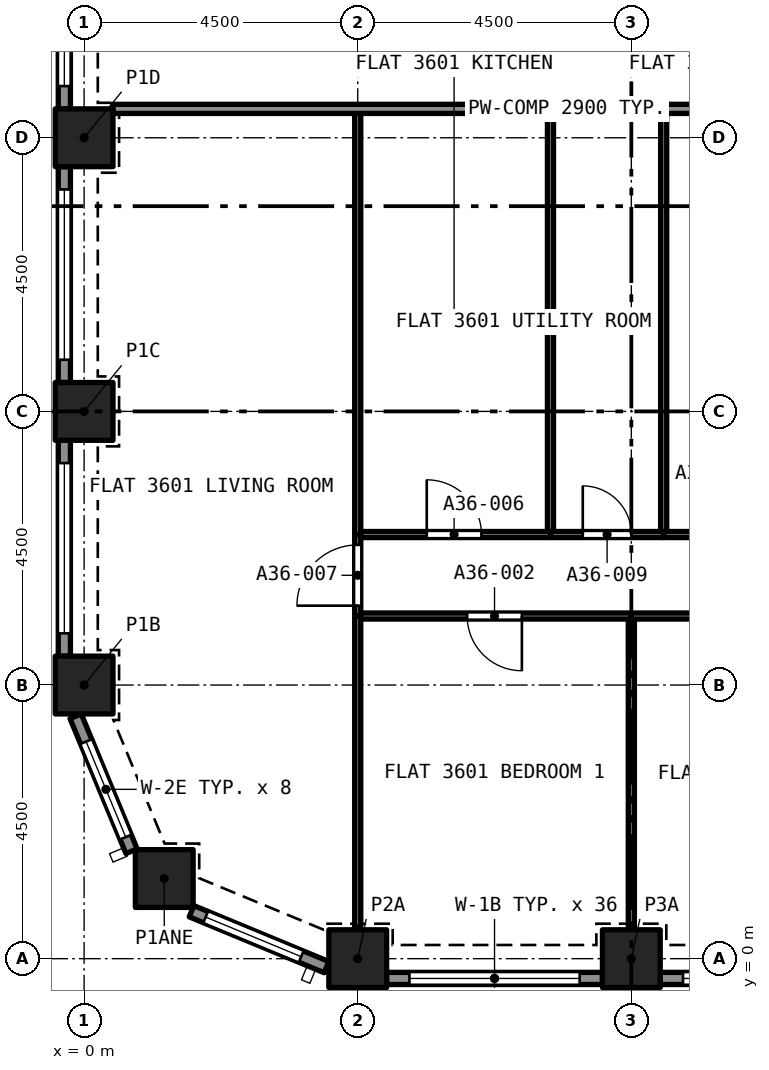
"""IFC4 building model, lengths in metres.
Left out: names, types, materials, properties, quantities, classifications, styles, units other than length and angle.
Written with IfcOpenShell. Run it as: python <this file> out.ifc"""

import sys

from ifc_helpers import new_model, si_unit, direction, frame, frame_2d, origin, origin_2d, place, context, subcontext, project, spatial, rectangle, extrude, element, fill, save


model = new_model("IFC4")
c1 = context("Model", 3, precision=1e-05, world=origin(), true_north=direction((0.0, 1.0)))
c2 = subcontext(c1, "Body", "Model", "MODEL_VIEW")
j1 = project(units=[si_unit("LENGTHUNIT", "METRE"), si_unit("PLANEANGLEUNIT", "RADIAN")], contexts=[c1])
p1 = place(None, origin())
s1 = spatial("IfcSite", under=j1, at=p1, CompositionType="ELEMENT")
p2 = place(p1, origin())
s2 = spatial("IfcBuilding", under=s1, at=p2, CompositionType="ELEMENT")
p3 = place(p2, frame((0.0, 0.0, 130.2)))
s3 = spatial("IfcBuildingStorey", under=s2, at=p3, CompositionType="ELEMENT", Elevation=130.2)
for number, where, z_axis, x_axis in (
    (1, (4.5, 0.0, 0.0), (0.0, 0.0, 1.0), (1.0, 0.0, 0.0)),
    (2, (9.0, 0.0, 0.0), (0.0, 0.0, 1.0), (1.0, 0.0, 0.0)),
    (3, (1.318, 1.318, 0.0), (0.0, 0.0, 1.0), (1.0, 0.0, 0.0)),
    (4, (0.0, 4.5, 0.0), (0.0, 0.0, 1.0), (1.0, 0.0, 0.0)),
    (5, (0.0, 9.0, 0.0), (0.0, 0.0, 1.0), (1.0, 0.0, 0.0)),
    (6, (0.0, 13.5, 0.0), (0.0, 0.0, 1.0), (1.0, 0.0, 0.0)),
):
    element("IfcColumn", number, at=place(p3, frame(where, z_axis=z_axis, x_axis=x_axis)), inside=s3, PredefinedType="COLUMN", context=c2, shape_type="SweptSolid", body=[
        extrude(rectangle(XDim=0.95, YDim=0.95, at=origin_2d()), origin(), (0.0, 0.0, 1.0), 3.2),
    ])
p4 = place(p3, frame((0.78, 1.767, 0.0), z_axis=(0.0, 0.0, 1.0), x_axis=(-0.382680855588, 0.923880599843, 0.0)))
e7 = element("IfcWall", 7, at=p4, inside=s3, PredefinedType="SOLIDWALL", context=c2, shape_type="SweptSolid", body=[
    extrude(rectangle(XDim=2.403, YDim=0.2, at=frame_2d((1.201, 0.0))), origin(), (0.0, 0.0, 1.0), 3.2),
])
p5 = place(p4, frame((0.251, 0.0, 0.45)))
e8 = element("IfcOpeningElement", 8, at=p5, cuts=e7, PredefinedType="OPENING", context=c2, shape_type="SweptSolid", body=[
    extrude(rectangle(XDim=1.7, YDim=1.95, at=frame_2d((0.85, 0.975))), frame((0.0, 0.11, 0.0), z_axis=(0.0, -1.0, 0.0), x_axis=(1.0, 0.0, 0.0)), (0.0, 0.0, 1.0), 0.22),
])
p6 = place(p3, frame((3.987, -0.139, 0.0), z_axis=(0.0, 0.0, 1.0), x_axis=(-0.923880599843, 0.382680855588, 0.0)))
e9 = element("IfcWall", 9, at=p6, inside=s3, PredefinedType="SOLIDWALL", context=c2, shape_type="SweptSolid", body=[
    extrude(rectangle(XDim=2.403, YDim=0.2, at=frame_2d((1.201, 0.0))), origin(), (0.0, 0.0, 1.0), 3.2),
])
p7 = place(p6, frame((0.451, 0.0, 0.45)))
e10 = element("IfcOpeningElement", 10, at=p7, cuts=e9, PredefinedType="OPENING", context=c2, shape_type="SweptSolid", body=[
    extrude(rectangle(XDim=1.7, YDim=1.95, at=frame_2d((0.85, 0.975))), frame((0.0, 0.11, 0.0), z_axis=(0.0, -1.0, 0.0), x_axis=(1.0, 0.0, 0.0)), (0.0, 0.0, 1.0), 0.22),
])
p8 = place(p3, frame((8.525, -0.325, 0.0), z_axis=(0.0, 0.0, 1.0), x_axis=(-1.0, 0.0, 0.0)))
e11 = element("IfcWall", 11, at=p8, inside=s3, PredefinedType="SOLIDWALL", context=c2, shape_type="SweptSolid", body=[
    extrude(rectangle(XDim=3.55, YDim=0.2, at=frame_2d((1.775, 0.0))), origin(), (0.0, 0.0, 1.0), 3.2),
])
p9 = place(p8, frame((0.375, 0.0, 0.45)))
e12 = element("IfcOpeningElement", 12, at=p9, cuts=e11, PredefinedType="OPENING", context=c2, shape_type="SweptSolid", body=[
    extrude(rectangle(XDim=2.8, YDim=1.95, at=frame_2d((1.4, 0.975))), frame((0.0, 0.11, 0.0), z_axis=(0.0, -1.0, 0.0), x_axis=(1.0, 0.0, 0.0)), (0.0, 0.0, 1.0), 0.22),
])
p10 = place(p3, frame((13.025, -0.325, 0.0), z_axis=(0.0, 0.0, 1.0), x_axis=(-1.0, 0.0, 0.0)))
e13 = element("IfcWall", 13, at=p10, inside=s3, PredefinedType="SOLIDWALL", context=c2, shape_type="SweptSolid", body=[
    extrude(rectangle(XDim=3.55, YDim=0.2, at=frame_2d((1.775, 0.0))), origin(), (0.0, 0.0, 1.0), 3.2),
])
p11 = place(p10, frame((0.375, 0.0, 0.45)))
e14 = element("IfcOpeningElement", 14, at=p11, cuts=e13, PredefinedType="OPENING", context=c2, shape_type="SweptSolid", body=[
    extrude(rectangle(XDim=2.8, YDim=1.95, at=frame_2d((1.4, 0.975))), frame((0.0, 0.11, 0.0), z_axis=(0.0, -1.0, 0.0), x_axis=(1.0, 0.0, 0.0)), (0.0, 0.0, 1.0), 0.22),
])
p12 = place(p3, frame((-0.325, 13.975, 0.0), z_axis=(0.0, 0.0, 1.0), x_axis=(0.0, 1.0, 0.0)))
e15 = element("IfcWall", 15, at=p12, inside=s3, PredefinedType="SOLIDWALL", context=c2, shape_type="SweptSolid", body=[
    extrude(rectangle(XDim=3.55, YDim=0.2, at=frame_2d((1.775, 0.0))), origin(), (0.0, 0.0, 1.0), 3.2),
])
p13 = place(p12, frame((0.375, 0.0, 0.45)))
e16 = element("IfcOpeningElement", 16, at=p13, cuts=e15, PredefinedType="OPENING", context=c2, shape_type="SweptSolid", body=[
    extrude(rectangle(XDim=2.8, YDim=1.95, at=frame_2d((1.4, 0.975))), frame((0.0, 0.11, 0.0), z_axis=(0.0, -1.0, 0.0), x_axis=(1.0, 0.0, 0.0)), (0.0, 0.0, 1.0), 0.22),
])
p14 = place(p3, frame((-0.325, 9.475, 0.0), z_axis=(0.0, 0.0, 1.0), x_axis=(0.0, 1.0, 0.0)))
e17 = element("IfcWall", 17, at=p14, inside=s3, PredefinedType="SOLIDWALL", context=c2, shape_type="SweptSolid", body=[
    extrude(rectangle(XDim=3.55, YDim=0.2, at=frame_2d((1.775, 0.0))), origin(), (0.0, 0.0, 1.0), 3.2),
])
p15 = place(p14, frame((0.375, 0.0, 0.45)))
e18 = element("IfcOpeningElement", 18, at=p15, cuts=e17, PredefinedType="OPENING", context=c2, shape_type="SweptSolid", body=[
    extrude(rectangle(XDim=2.8, YDim=1.95, at=frame_2d((1.4, 0.975))), frame((0.0, 0.11, 0.0), z_axis=(0.0, -1.0, 0.0), x_axis=(1.0, 0.0, 0.0)), (0.0, 0.0, 1.0), 0.22),
])
p16 = place(p3, frame((-0.325, 4.975, 0.0), z_axis=(0.0, 0.0, 1.0), x_axis=(0.0, 1.0, 0.0)))
e19 = element("IfcWall", 19, at=p16, inside=s3, PredefinedType="SOLIDWALL", context=c2, shape_type="SweptSolid", body=[
    extrude(rectangle(XDim=3.55, YDim=0.2, at=frame_2d((1.775, 0.0))), origin(), (0.0, 0.0, 1.0), 3.2),
])
p17 = place(p16, frame((0.375, 0.0, 0.45)))
e20 = element("IfcOpeningElement", 20, at=p17, cuts=e19, PredefinedType="OPENING", context=c2, shape_type="SweptSolid", body=[
    extrude(rectangle(XDim=2.8, YDim=1.95, at=frame_2d((1.4, 0.975))), frame((0.0, 0.11, 0.0), z_axis=(0.0, -1.0, 0.0), x_axis=(1.0, 0.0, 0.0)), (0.0, 0.0, 1.0), 0.22),
])
p18 = place(p3, frame((9.0, 0.475, 0.0), z_axis=(0.0, 0.0, 1.0), x_axis=(0.0, 1.0, 0.0)))
e21 = element("IfcWall", 21, at=p18, inside=s3, PredefinedType="PARTITIONING", context=c2, shape_type="SweptSolid", body=[
    extrude(rectangle(XDim=5.11, YDim=0.1, at=frame_2d((2.555, 0.0))), origin(), (0.0, 0.0, 1.0), 2.9),
])
p19 = place(p3, frame((9.0, 5.635, 0.0), z_axis=(0.0, 0.0, 1.0), x_axis=(-1.0, 0.0, 0.0)))
e22 = element("IfcWall", 22, at=p19, inside=s3, PredefinedType="PARTITIONING", context=c2, shape_type="SweptSolid", body=[
    extrude(rectangle(XDim=4.45, YDim=0.1, at=frame_2d((2.225, 0.0))), origin(), (0.0, 0.0, 1.0), 2.9),
])
p20 = place(p19, frame((1.8, 0.0, 0.0)))
e23 = element("IfcOpeningElement", 23, at=p20, cuts=e22, PredefinedType="OPENING", context=c2, shape_type="SweptSolid", body=[
    extrude(rectangle(XDim=0.9, YDim=2.1, at=frame_2d((0.45, 1.05))), frame((0.0, 0.06, 0.0), z_axis=(0.0, -1.0, 0.0), x_axis=(1.0, 0.0, 0.0)), (0.0, 0.0, 1.0), 0.12),
])
p21 = place(p3, frame((4.5, 0.514, 0.0), z_axis=(0.0, 0.0, 1.0), x_axis=(0.0, 1.0, 0.0)))
e24 = element("IfcWall", 24, at=p21, inside=s3, PredefinedType="PARTITIONING", context=c2, shape_type="SweptSolid", body=[
    extrude(rectangle(XDim=5.121, YDim=0.1, at=frame_2d((2.561, 0.0))), origin(), (0.0, 0.0, 1.0), 2.9),
])
p22 = place(p3, frame((13.5, 5.635, 0.0), z_axis=(0.0, 0.0, 1.0), x_axis=(-1.0, 0.0, 0.0)))
e25 = element("IfcWall", 25, at=p22, inside=s3, PredefinedType="PARTITIONING", context=c2, shape_type="SweptSolid", body=[
    extrude(rectangle(XDim=4.5, YDim=0.1, at=frame_2d((2.25, 0.0))), origin(), (0.0, 0.0, 1.0), 2.9),
])
p23 = place(p22, frame((1.8, 0.0, 0.0)))
e26 = element("IfcOpeningElement", 26, at=p23, cuts=e25, PredefinedType="OPENING", context=c2, shape_type="SweptSolid", body=[
    extrude(rectangle(XDim=0.9, YDim=2.1, at=frame_2d((0.45, 1.05))), frame((0.0, 0.06, 0.0), z_axis=(0.0, -1.0, 0.0), x_axis=(1.0, 0.0, 0.0)), (0.0, 0.0, 1.0), 0.12),
])
p24 = place(p3, frame((4.55, 6.975, 0.0), z_axis=(0.0, 0.0, 1.0), x_axis=(1.0, 0.0, 0.0)))
e27 = element("IfcWall", 27, at=p24, inside=s3, PredefinedType="PARTITIONING", context=c2, shape_type="SweptSolid", body=[
    extrude(rectangle(XDim=3.12, YDim=0.1, at=frame_2d((1.56, 0.0))), origin(), (0.0, 0.0, 1.0), 2.9),
])
p25 = place(p24, frame((1.085, 0.0, 0.0)))
e28 = element("IfcOpeningElement", 28, at=p25, cuts=e27, PredefinedType="OPENING", context=c2, shape_type="SweptSolid", body=[
    extrude(rectangle(XDim=0.9, YDim=2.1, at=frame_2d((0.45, 1.05))), frame((0.0, 0.06, 0.0), z_axis=(0.0, -1.0, 0.0), x_axis=(1.0, 0.0, 0.0)), (0.0, 0.0, 1.0), 0.12),
])
p26 = place(p3, frame((4.5, 5.635, 0.0), z_axis=(0.0, 0.0, 1.0), x_axis=(0.0, 1.0, 0.0)))
e29 = element("IfcWall", 29, at=p26, inside=s3, PredefinedType="PARTITIONING", context=c2, shape_type="SweptSolid", body=[
    extrude(rectangle(XDim=1.34, YDim=0.1, at=frame_2d((0.67, 0.0))), origin(), (0.0, 0.0, 1.0), 2.9),
])
p27 = place(p26, frame((0.17, 0.0, 0.0)))
e30 = element("IfcOpeningElement", 30, at=p27, cuts=e29, PredefinedType="OPENING", context=c2, shape_type="SweptSolid", body=[
    extrude(rectangle(XDim=1.0, YDim=2.1, at=frame_2d((0.5, 1.05))), frame((0.0, 0.06, 0.0), z_axis=(0.0, -1.0, 0.0), x_axis=(1.0, 0.0, 0.0)), (0.0, 0.0, 1.0), 0.12),
])
p28 = place(p3, frame((9.532, 6.975, 0.0), z_axis=(0.0, 0.0, 1.0), x_axis=(1.0, 0.0, 0.0)))
e31 = element("IfcWall", 31, at=p28, inside=s3, PredefinedType="PARTITIONING", context=c2, shape_type="SweptSolid", body=[
    extrude(rectangle(XDim=1.713, YDim=0.1, at=frame_2d((0.857, 0.0))), origin(), (0.0, 0.0, 1.0), 2.9),
])
p29 = place(p28, frame((0.457, 0.0, 0.0)))
e32 = element("IfcOpeningElement", 32, at=p29, cuts=e31, PredefinedType="OPENING", context=c2, shape_type="SweptSolid", body=[
    extrude(rectangle(XDim=0.8, YDim=2.1, at=frame_2d((0.4, 1.05))), frame((0.0, 0.06, 0.0), z_axis=(0.0, -1.0, 0.0), x_axis=(1.0, 0.0, 0.0)), (0.0, 0.0, 1.0), 0.12),
])
p30 = place(p3, frame((7.67, 6.975, 0.0), z_axis=(0.0, 0.0, 1.0), x_axis=(1.0, 0.0, 0.0)))
e33 = element("IfcWall", 33, at=p30, inside=s3, PredefinedType="PARTITIONING", context=c2, shape_type="SweptSolid", body=[
    extrude(rectangle(XDim=1.862, YDim=0.1, at=frame_2d((0.931, 0.0))), origin(), (0.0, 0.0, 1.0), 2.9),
])
p31 = place(p30, frame((0.531, 0.0, 0.0)))
e34 = element("IfcOpeningElement", 34, at=p31, cuts=e33, PredefinedType="OPENING", context=c2, shape_type="SweptSolid", body=[
    extrude(rectangle(XDim=0.8, YDim=2.1, at=frame_2d((0.4, 1.05))), frame((0.0, 0.06, 0.0), z_axis=(0.0, -1.0, 0.0), x_axis=(1.0, 0.0, 0.0)), (0.0, 0.0, 1.0), 0.12),
])
p32 = place(p3, frame((4.5, 6.975, 0.0), z_axis=(0.0, 0.0, 1.0), x_axis=(0.0, 1.0, 0.0)))
e35 = element("IfcWall", 35, at=p32, inside=s3, PredefinedType="PARTITIONING", context=c2, shape_type="SweptSolid", body=[
    extrude(rectangle(XDim=6.925, YDim=0.1, at=frame_2d((3.462, 0.0))), origin(), (0.0, 0.0, 1.0), 2.9),
])
p33 = place(p3, frame((7.67, 7.025, 0.0), z_axis=(0.0, 0.0, 1.0), x_axis=(0.0, 1.0, 0.0)))
e36 = element("IfcWall", 36, at=p33, inside=s3, PredefinedType="PARTITIONING", context=c2, shape_type="SweptSolid", body=[
    extrude(rectangle(XDim=6.875, YDim=0.1, at=frame_2d((3.438, 0.0))), origin(), (0.0, 0.0, 1.0), 2.9),
])
p34 = place(p3, frame((0.475, 13.975, 0.0), z_axis=(0.0, 0.0, 1.0), x_axis=(1.0, 0.0, 0.0)))
e37 = element("IfcWall", 37, at=p34, inside=s3, PredefinedType="PARTITIONING", context=c2, shape_type="SweptSolid", body=[
    extrude(rectangle(XDim=13.55, YDim=0.15, at=frame_2d((6.775, 0.0))), origin(), (0.0, 0.0, 1.0), 2.9),
])
p35 = place(p3, frame((9.532, 7.025, 0.0), z_axis=(0.0, 0.0, 1.0), x_axis=(0.0, 1.0, 0.0)))
e38 = element("IfcWall", 38, at=p35, inside=s3, PredefinedType="PARTITIONING", context=c2, shape_type="SweptSolid", body=[
    extrude(rectangle(XDim=6.875, YDim=0.1, at=frame_2d((3.438, 0.0))), origin(), (0.0, 0.0, 1.0), 2.9),
])
p36 = place(p5, origin())
e39 = element("IfcWindow", 39, at=p36, inside=s3, PartitioningType="SINGLE_PANEL", PredefinedType="WINDOW", context=c2, shape_type="SweptSolid", body=[
    extrude(rectangle(XDim=1.7, YDim=1.95, at=frame_2d((0.85, 0.975))), frame((0.0, 0.03, 0.0), z_axis=(0.0, -1.0, 0.0), x_axis=(1.0, 0.0, 0.0)), (0.0, 0.0, 1.0), 0.06),
])
fill(e8, e39)
p37 = place(p7, origin())
e40 = element("IfcWindow", 40, at=p37, inside=s3, PartitioningType="SINGLE_PANEL", PredefinedType="WINDOW", context=c2, shape_type="SweptSolid", body=[
    extrude(rectangle(XDim=1.7, YDim=1.95, at=frame_2d((0.85, 0.975))), frame((0.0, 0.03, 0.0), z_axis=(0.0, -1.0, 0.0), x_axis=(1.0, 0.0, 0.0)), (0.0, 0.0, 1.0), 0.06),
])
fill(e10, e40)
p38 = place(p9, origin())
e41 = element("IfcWindow", 41, at=p38, inside=s3, PartitioningType="SINGLE_PANEL", PredefinedType="WINDOW", context=c2, shape_type="SweptSolid", body=[
    extrude(rectangle(XDim=2.8, YDim=1.95, at=frame_2d((1.4, 0.975))), frame((0.0, 0.03, 0.0), z_axis=(0.0, -1.0, 0.0), x_axis=(1.0, 0.0, 0.0)), (0.0, 0.0, 1.0), 0.06),
])
fill(e12, e41)
p39 = place(p11, origin())
e42 = element("IfcWindow", 42, at=p39, inside=s3, PartitioningType="SINGLE_PANEL", PredefinedType="WINDOW", context=c2, shape_type="SweptSolid", body=[
    extrude(rectangle(XDim=2.8, YDim=1.95, at=frame_2d((1.4, 0.975))), frame((0.0, 0.03, 0.0), z_axis=(0.0, -1.0, 0.0), x_axis=(1.0, 0.0, 0.0)), (0.0, 0.0, 1.0), 0.06),
])
fill(e14, e42)
p40 = place(p13, origin())
e43 = element("IfcWindow", 43, at=p40, inside=s3, PartitioningType="SINGLE_PANEL", PredefinedType="WINDOW", context=c2, shape_type="SweptSolid", body=[
    extrude(rectangle(XDim=2.8, YDim=1.95, at=frame_2d((1.4, 0.975))), frame((0.0, 0.03, 0.0), z_axis=(0.0, -1.0, 0.0), x_axis=(1.0, 0.0, 0.0)), (0.0, 0.0, 1.0), 0.06),
])
fill(e16, e43)
p41 = place(p15, origin())
e44 = element("IfcWindow", 44, at=p41, inside=s3, PartitioningType="SINGLE_PANEL", PredefinedType="WINDOW", context=c2, shape_type="SweptSolid", body=[
    extrude(rectangle(XDim=2.8, YDim=1.95, at=frame_2d((1.4, 0.975))), frame((0.0, 0.03, 0.0), z_axis=(0.0, -1.0, 0.0), x_axis=(1.0, 0.0, 0.0)), (0.0, 0.0, 1.0), 0.06),
])
fill(e18, e44)
p42 = place(p17, origin())
e45 = element("IfcWindow", 45, at=p42, inside=s3, PartitioningType="SINGLE_PANEL", PredefinedType="WINDOW", context=c2, shape_type="SweptSolid", body=[
    extrude(rectangle(XDim=2.8, YDim=1.95, at=frame_2d((1.4, 0.975))), frame((0.0, 0.03, 0.0), z_axis=(0.0, -1.0, 0.0), x_axis=(1.0, 0.0, 0.0)), (0.0, 0.0, 1.0), 0.06),
])
fill(e20, e45)
p43 = place(p20, origin())
e46 = element("IfcDoor", 46, at=p43, inside=s3, OperationType="SINGLE_SWING_RIGHT", PredefinedType="DOOR", context=c2, shape_type="SweptSolid", body=[
    extrude(rectangle(XDim=0.9, YDim=2.1, at=frame_2d((0.45, 1.05))), frame((0.0, 0.025, 0.0), z_axis=(0.0, -1.0, 0.0), x_axis=(1.0, 0.0, 0.0)), (0.0, 0.0, 1.0), 0.05),
])
fill(e23, e46)
p44 = place(p25, origin())
e47 = element("IfcDoor", 47, at=p44, inside=s3, OperationType="SINGLE_SWING_LEFT", PredefinedType="DOOR", context=c2, shape_type="SweptSolid", body=[
    extrude(rectangle(XDim=0.9, YDim=2.1, at=frame_2d((0.45, 1.05))), frame((0.0, 0.025, 0.0), z_axis=(0.0, -1.0, 0.0), x_axis=(1.0, 0.0, 0.0)), (0.0, 0.0, 1.0), 0.05),
])
fill(e28, e47)
p45 = place(p27, origin())
e48 = element("IfcDoor", 48, at=p45, inside=s3, OperationType="SINGLE_SWING_RIGHT", PredefinedType="DOOR", context=c2, shape_type="SweptSolid", body=[
    extrude(rectangle(XDim=1.0, YDim=2.1, at=frame_2d((0.5, 1.05))), frame((0.0, 0.025, 0.0), z_axis=(0.0, -1.0, 0.0), x_axis=(1.0, 0.0, 0.0)), (0.0, 0.0, 1.0), 0.05),
])
fill(e30, e48)
p46 = place(p31, origin())
e49 = element("IfcDoor", 49, at=p46, inside=s3, OperationType="SINGLE_SWING_LEFT", PredefinedType="DOOR", context=c2, shape_type="SweptSolid", body=[
    extrude(rectangle(XDim=0.8, YDim=2.1, at=frame_2d((0.4, 1.05))), frame((0.0, 0.025, 0.0), z_axis=(0.0, -1.0, 0.0), x_axis=(1.0, 0.0, 0.0)), (0.0, 0.0, 1.0), 0.05),
])
fill(e34, e49)
save(model, sys.argv[1])
